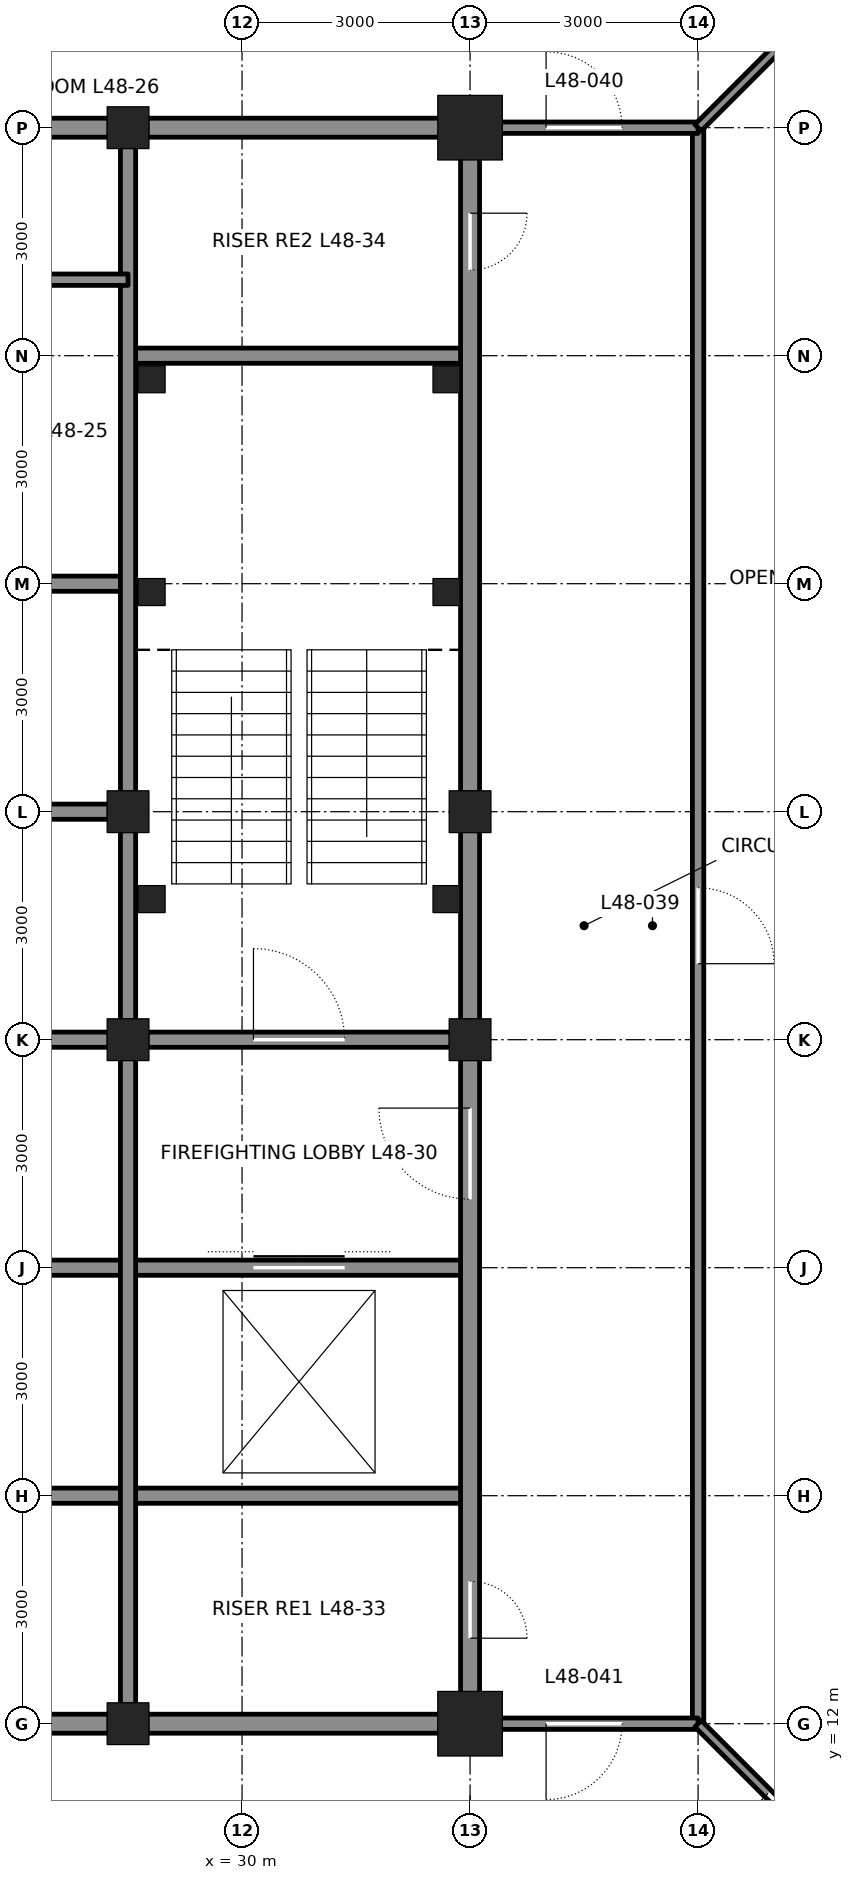
"""IFC4 building model, lengths in metres.
Left out: names, types, materials, properties, quantities, classifications, styles, units other than length and angle.
Written with IfcOpenShell. Run it as: python <this file> out.ifc"""

import sys

from ifc_helpers import new_model, si_unit, direction, frame, frame_2d, origin, origin_2d, place, context, subcontext, project, spatial, rectangle, hollow_rectangle, extrude, element, fill, save


model = new_model("IFC4")
c1 = context("Model", 3, precision=1e-05, world=origin(), true_north=direction((0.0, 1.0)))
c2 = subcontext(c1, "Body", "Model", "MODEL_VIEW")
j1 = project(units=[si_unit("LENGTHUNIT", "METRE"), si_unit("PLANEANGLEUNIT", "RADIAN")], contexts=[c1])
p1 = place(None, origin())
s1 = spatial("IfcSite", under=j1, at=p1, CompositionType="ELEMENT")
p2 = place(p1, origin())
s2 = spatial("IfcBuilding", under=s1, at=p2, CompositionType="ELEMENT")
p3 = place(p2, frame((0.0, 0.0, 218.1)))
s3 = spatial("IfcBuildingStorey", under=s2, at=p3, CompositionType="ELEMENT", Elevation=218.1)
p4 = place(p3, frame((28.5, 12.0, 0.0), z_axis=(0.0, 0.0, 1.0), x_axis=(1.0, 0.0, 0.0)))
e1 = element("IfcColumn", 1, at=p4, inside=s3, PredefinedType="COLUMN", context=c2, shape_type="SweptSolid", body=[
    extrude(hollow_rectangle(XDim=0.55, YDim=0.55, WallThickness=0.045, at=origin_2d()), origin(), (0.0, 0.0, 1.0), 4.2),
])
p5 = place(p3, frame((33.0, 12.0, 0.0), z_axis=(0.0, 0.0, 1.0), x_axis=(1.0, 0.0, 0.0)))
e2 = element("IfcColumn", 2, at=p5, inside=s3, PredefinedType="COLUMN", context=c2, shape_type="SweptSolid", body=[
    extrude(hollow_rectangle(XDim=0.85, YDim=0.85, WallThickness=0.085, at=origin_2d()), origin(), (0.0, 0.0, 1.0), 4.2),
])
p6 = place(p3, frame((28.5, 33.0, 0.0), z_axis=(0.0, 0.0, 1.0), x_axis=(1.0, 0.0, 0.0)))
e3 = element("IfcColumn", 3, at=p6, inside=s3, PredefinedType="COLUMN", context=c2, shape_type="SweptSolid", body=[
    extrude(hollow_rectangle(XDim=0.55, YDim=0.55, WallThickness=0.045, at=origin_2d()), origin(), (0.0, 0.0, 1.0), 4.2),
])
p7 = place(p3, frame((33.0, 33.0, 0.0), z_axis=(0.0, 0.0, 1.0), x_axis=(1.0, 0.0, 0.0)))
e4 = element("IfcColumn", 4, at=p7, inside=s3, PredefinedType="COLUMN", context=c2, shape_type="SweptSolid", body=[
    extrude(hollow_rectangle(XDim=0.85, YDim=0.85, WallThickness=0.085, at=origin_2d()), origin(), (0.0, 0.0, 1.0), 4.2),
])
for number, where, z_axis, x_axis in (
    (5, (33.0, 21.0, 0.0), (0.0, 0.0, 1.0), (1.0, 0.0, 0.0)),
    (6, (33.0, 24.0, 0.0), (0.0, 0.0, 1.0), (1.0, 0.0, 0.0)),
    (7, (28.5, 21.0, 0.0), (0.0, 0.0, 1.0), (1.0, 0.0, 0.0)),
    (8, (28.5, 24.0, 0.0), (0.0, 0.0, 1.0), (1.0, 0.0, 0.0)),
):
    element("IfcColumn", number, at=place(p3, frame(where, z_axis=z_axis, x_axis=x_axis)), inside=s3, PredefinedType="COLUMN", context=c2, shape_type="SweptSolid", body=[
        extrude(hollow_rectangle(XDim=0.55, YDim=0.55, WallThickness=0.045, at=origin_2d()), origin(), (0.0, 0.0, 1.0), 4.2),
    ])
p8 = place(p3, frame((25.75, 12.0, 0.0), z_axis=(0.0, 0.0, 1.0), x_axis=(1.0, 0.0, 0.0)))
e9 = element("IfcWall", 9, at=p8, inside=s3, PredefinedType="SOLIDWALL", context=c2, shape_type="SweptSolid", body=[
    extrude(rectangle(XDim=2.5, YDim=0.25, at=frame_2d((1.25, 0.0))), origin(), (0.0, 0.0, 1.0), 3.181),
])
p9 = place(p3, frame((28.75, 12.0, 0.0), z_axis=(0.0, 0.0, 1.0), x_axis=(1.0, 0.0, 0.0)))
e10 = element("IfcWall", 10, at=p9, inside=s3, PredefinedType="SOLIDWALL", context=c2, shape_type="SweptSolid", body=[
    extrude(rectangle(XDim=4.0, YDim=0.25, at=frame_2d((2.0, 0.0))), origin(), (0.0, 0.0, 1.0), 3.181),
])
p10 = place(p3, frame((25.5, 15.0, 0.0), z_axis=(0.0, 0.0, 1.0), x_axis=(1.0, 0.0, 0.0)))
e11 = element("IfcWall", 11, at=p10, inside=s3, PredefinedType="SOLIDWALL", context=c2, shape_type="SweptSolid", body=[
    extrude(rectangle(XDim=7.5, YDim=0.2, at=frame_2d((3.75, 0.0))), origin(), (0.0, 0.0, 1.0), 4.04),
])
p11 = place(p3, frame((25.5, 24.0, 0.0), z_axis=(0.0, 0.0, 1.0), x_axis=(1.0, 0.0, 0.0)))
e12 = element("IfcWall", 12, at=p11, inside=s3, PredefinedType="SOLIDWALL", context=c2, shape_type="SweptSolid", body=[
    extrude(rectangle(XDim=2.75, YDim=0.2, at=frame_2d((1.375, 0.0))), origin(), (0.0, 0.0, 1.0), 3.09),
])
p12 = place(p3, frame((25.5, 27.0, 0.0), z_axis=(0.0, 0.0, 1.0), x_axis=(1.0, 0.0, 0.0)))
e13 = element("IfcWall", 13, at=p12, inside=s3, PredefinedType="SOLIDWALL", context=c2, shape_type="SweptSolid", body=[
    extrude(rectangle(XDim=3.0, YDim=0.2, at=frame_2d((1.5, 0.0))), origin(), (0.0, 0.0, 1.0), 4.04),
])
p13 = place(p3, frame((28.5, 30.0, 0.0), z_axis=(0.0, 0.0, 1.0), x_axis=(1.0, 0.0, 0.0)))
e14 = element("IfcWall", 14, at=p13, inside=s3, PredefinedType="SOLIDWALL", context=c2, shape_type="SweptSolid", body=[
    extrude(rectangle(XDim=4.5, YDim=0.2, at=frame_2d((2.25, 0.0))), origin(), (0.0, 0.0, 1.0), 4.04),
])
p14 = place(p3, frame((25.75, 33.0, 0.0), z_axis=(0.0, 0.0, 1.0), x_axis=(1.0, 0.0, 0.0)))
e15 = element("IfcWall", 15, at=p14, inside=s3, PredefinedType="SOLIDWALL", context=c2, shape_type="SweptSolid", body=[
    extrude(rectangle(XDim=2.5, YDim=0.25, at=frame_2d((1.25, 0.0))), origin(), (0.0, 0.0, 1.0), 3.181),
])
p15 = place(p3, frame((28.75, 33.0, 0.0), z_axis=(0.0, 0.0, 1.0), x_axis=(1.0, 0.0, 0.0)))
e16 = element("IfcWall", 16, at=p15, inside=s3, PredefinedType="SOLIDWALL", context=c2, shape_type="SweptSolid", body=[
    extrude(rectangle(XDim=4.0, YDim=0.25, at=frame_2d((2.0, 0.0))), origin(), (0.0, 0.0, 1.0), 3.181),
])
p16 = place(p3, frame((25.5, 18.0, 0.0), z_axis=(0.0, 0.0, 1.0), x_axis=(1.0, 0.0, 0.0)))
e17 = element("IfcWall", 17, at=p16, inside=s3, PredefinedType="SOLIDWALL", context=c2, shape_type="SweptSolid", body=[
    extrude(rectangle(XDim=7.5, YDim=0.2, at=frame_2d((3.75, 0.0))), origin(), (0.0, 0.0, 1.0), 4.04),
])
p17 = place(p16, frame((4.65, 0.0, 0.0)))
e18 = element("IfcOpeningElement", 18, at=p17, cuts=e17, PredefinedType="OPENING", context=c2, shape_type="SweptSolid", body=[
    extrude(rectangle(XDim=1.2, YDim=2.1, at=frame_2d((0.6, 1.05))), frame((0.0, 0.11, 0.0), z_axis=(0.0, -1.0, 0.0), x_axis=(1.0, 0.0, 0.0)), (0.0, 0.0, 1.0), 0.22),
])
p18 = place(p3, frame((25.5, 21.0, 0.0), z_axis=(0.0, 0.0, 1.0), x_axis=(1.0, 0.0, 0.0)))
e19 = element("IfcWall", 19, at=p18, inside=s3, PredefinedType="SOLIDWALL", context=c2, shape_type="SweptSolid", body=[
    extrude(rectangle(XDim=2.75, YDim=0.2, at=frame_2d((1.375, 0.0))), origin(), (0.0, 0.0, 1.0), 3.09),
])
p19 = place(p3, frame((28.75, 21.0, 0.0), z_axis=(0.0, 0.0, 1.0), x_axis=(1.0, 0.0, 0.0)))
e20 = element("IfcWall", 20, at=p19, inside=s3, PredefinedType="SOLIDWALL", context=c2, shape_type="SweptSolid", body=[
    extrude(rectangle(XDim=4.0, YDim=0.2, at=frame_2d((2.0, 0.0))), origin(), (0.0, 0.0, 1.0), 3.09),
])
p20 = place(p19, frame((1.4, 0.0, 0.0)))
e21 = element("IfcOpeningElement", 21, at=p20, cuts=e20, PredefinedType="OPENING", context=c2, shape_type="SweptSolid", body=[
    extrude(rectangle(XDim=1.2, YDim=2.1, at=frame_2d((0.6, 1.05))), frame((0.0, 0.11, 0.0), z_axis=(0.0, -1.0, 0.0), x_axis=(1.0, 0.0, 0.0)), (0.0, 0.0, 1.0), 0.22),
])
p21 = place(p3, frame((28.5, 12.25, 0.0), z_axis=(0.0, 0.0, 1.0), x_axis=(0.0, 1.0, 0.0)))
e22 = element("IfcWall", 22, at=p21, inside=s3, PredefinedType="SOLIDWALL", context=c2, shape_type="SweptSolid", body=[
    extrude(rectangle(XDim=8.5, YDim=0.2, at=frame_2d((4.25, 0.0))), origin(), (0.0, 0.0, 1.0), 3.113),
])
p22 = place(p3, frame((28.5, 21.25, 0.0), z_axis=(0.0, 0.0, 1.0), x_axis=(0.0, 1.0, 0.0)))
e23 = element("IfcWall", 23, at=p22, inside=s3, PredefinedType="SOLIDWALL", context=c2, shape_type="SweptSolid", body=[
    extrude(rectangle(XDim=2.5, YDim=0.2, at=frame_2d((1.25, 0.0))), origin(), (0.0, 0.0, 1.0), 3.113),
])
p23 = place(p3, frame((28.5, 24.25, 0.0), z_axis=(0.0, 0.0, 1.0), x_axis=(0.0, 1.0, 0.0)))
e24 = element("IfcWall", 24, at=p23, inside=s3, PredefinedType="SOLIDWALL", context=c2, shape_type="SweptSolid", body=[
    extrude(rectangle(XDim=8.5, YDim=0.2, at=frame_2d((4.25, 0.0))), origin(), (0.0, 0.0, 1.0), 3.113),
])
p24 = place(p3, frame((33.0, 12.25, 0.0), z_axis=(0.0, 0.0, 1.0), x_axis=(0.0, 1.0, 0.0)))
e25 = element("IfcWall", 25, at=p24, inside=s3, PredefinedType="SOLIDWALL", context=c2, shape_type="SweptSolid", body=[
    extrude(rectangle(XDim=8.5, YDim=0.25, at=frame_2d((4.25, 0.0))), origin(), (0.0, 0.0, 1.0), 3.113),
])
p25 = place(p24, frame((6.65, 0.0, 0.0)))
e26 = element("IfcOpeningElement", 26, at=p25, cuts=e25, PredefinedType="OPENING", context=c2, shape_type="SweptSolid", body=[
    extrude(rectangle(XDim=1.2, YDim=2.1, at=frame_2d((0.6, 1.05))), frame((0.0, 0.135, 0.0), z_axis=(0.0, -1.0, 0.0), x_axis=(1.0, 0.0, 0.0)), (0.0, 0.0, 1.0), 0.27),
])
p26 = place(p24, frame((0.875, 0.0, 0.0)))
e27 = element("IfcOpeningElement", 27, at=p26, cuts=e25, PredefinedType="OPENING", context=c2, shape_type="SweptSolid", body=[
    extrude(rectangle(XDim=0.75, YDim=2.1, at=frame_2d((0.375, 1.05))), frame((0.0, 0.135, 0.0), z_axis=(0.0, -1.0, 0.0), x_axis=(1.0, 0.0, 0.0)), (0.0, 0.0, 1.0), 0.27),
])
p27 = place(p3, frame((33.0, 21.25, 0.0), z_axis=(0.0, 0.0, 1.0), x_axis=(0.0, 1.0, 0.0)))
e28 = element("IfcWall", 28, at=p27, inside=s3, PredefinedType="SOLIDWALL", context=c2, shape_type="SweptSolid", body=[
    extrude(rectangle(XDim=2.5, YDim=0.25, at=frame_2d((1.25, 0.0))), origin(), (0.0, 0.0, 1.0), 3.113),
])
p28 = place(p3, frame((33.0, 24.25, 0.0), z_axis=(0.0, 0.0, 1.0), x_axis=(0.0, 1.0, 0.0)))
e29 = element("IfcWall", 29, at=p28, inside=s3, PredefinedType="SOLIDWALL", context=c2, shape_type="SweptSolid", body=[
    extrude(rectangle(XDim=8.5, YDim=0.25, at=frame_2d((4.25, 0.0))), origin(), (0.0, 0.0, 1.0), 3.113),
])
p29 = place(p28, frame((6.875, 0.0, 0.0)))
e30 = element("IfcOpeningElement", 30, at=p29, cuts=e29, PredefinedType="OPENING", context=c2, shape_type="SweptSolid", body=[
    extrude(rectangle(XDim=0.75, YDim=2.1, at=frame_2d((0.375, 1.05))), frame((0.0, 0.135, 0.0), z_axis=(0.0, -1.0, 0.0), x_axis=(1.0, 0.0, 0.0)), (0.0, 0.0, 1.0), 0.27),
])
p30 = place(p3, frame((25.5, 31.0, 0.0), z_axis=(0.0, 0.0, 1.0), x_axis=(1.0, 0.0, 0.0)))
e31 = element("IfcWall", 31, at=p30, inside=s3, PredefinedType="PARTITIONING", context=c2, shape_type="SweptSolid", body=[
    extrude(rectangle(XDim=3.0, YDim=0.15, at=frame_2d((1.5, 0.0))), origin(), (0.0, 0.0, 1.0), 4.04),
])
p31 = place(p3, frame((36.0, 12.0, 0.0), z_axis=(0.0, 0.0, 1.0), x_axis=(0.0, 1.0, 0.0)))
e32 = element("IfcWall", 32, at=p31, inside=s3, PredefinedType="PARTITIONING", context=c2, shape_type="SweptSolid", body=[
    extrude(rectangle(XDim=21.0, YDim=0.15, at=frame_2d((10.5, 0.0))), origin(), (0.0, 0.0, 1.0), 4.04),
])
p32 = place(p31, frame((10.0, 0.0, 0.0)))
e33 = element("IfcOpeningElement", 33, at=p32, cuts=e32, PredefinedType="OPENING", context=c2, shape_type="SweptSolid", body=[
    extrude(rectangle(XDim=1.0, YDim=2.4, at=frame_2d((0.5, 1.2))), frame((0.0, 0.085, 0.0), z_axis=(0.0, -1.0, 0.0), x_axis=(1.0, 0.0, 0.0)), (0.0, 0.0, 1.0), 0.17),
])
p33 = place(p3, frame((33.0, 33.0, 0.0), z_axis=(0.0, 0.0, 1.0), x_axis=(1.0, 0.0, 0.0)))
e34 = element("IfcWall", 34, at=p33, inside=s3, PredefinedType="PARTITIONING", context=c2, shape_type="SweptSolid", body=[
    extrude(rectangle(XDim=3.0, YDim=0.15, at=frame_2d((1.5, 0.0))), origin(), (0.0, 0.0, 1.0), 3.27),
])
p34 = place(p33, frame((1.0, 0.0, 0.0)))
e35 = element("IfcOpeningElement", 35, at=p34, cuts=e34, PredefinedType="OPENING", context=c2, shape_type="SweptSolid", body=[
    extrude(rectangle(XDim=1.0, YDim=2.4, at=frame_2d((0.5, 1.2))), frame((0.0, 0.085, 0.0), z_axis=(0.0, -1.0, 0.0), x_axis=(1.0, 0.0, 0.0)), (0.0, 0.0, 1.0), 0.17),
])
p35 = place(p3, frame((33.0, 12.0, 0.0), z_axis=(0.0, 0.0, 1.0), x_axis=(1.0, 0.0, 0.0)))
e36 = element("IfcWall", 36, at=p35, inside=s3, PredefinedType="PARTITIONING", context=c2, shape_type="SweptSolid", body=[
    extrude(rectangle(XDim=3.0, YDim=0.15, at=frame_2d((1.5, 0.0))), origin(), (0.0, 0.0, 1.0), 3.27),
])
p36 = place(p35, frame((1.0, 0.0, 0.0)))
e37 = element("IfcOpeningElement", 37, at=p36, cuts=e36, PredefinedType="OPENING", context=c2, shape_type="SweptSolid", body=[
    extrude(rectangle(XDim=1.0, YDim=2.4, at=frame_2d((0.5, 1.2))), frame((0.0, 0.085, 0.0), z_axis=(0.0, -1.0, 0.0), x_axis=(1.0, 0.0, 0.0)), (0.0, 0.0, 1.0), 0.17),
])
p37 = place(p3, frame((36.0, 33.0, 0.0), z_axis=(0.0, 0.0, 1.0), x_axis=(0.707106781187, 0.707106781187, 0.0)))
e38 = element("IfcWall", 38, at=p37, inside=s3, PredefinedType="PARTITIONING", context=c2, shape_type="SweptSolid", body=[
    extrude(rectangle(XDim=1.489, YDim=0.12, at=frame_2d((0.745, 0.0))), origin(), (0.0, 0.0, 1.0), 4.04),
])
p38 = place(p3, frame((36.0, 12.0, 0.0), z_axis=(0.0, 0.0, 1.0), x_axis=(0.707106781187, -0.707106781187, 0.0)))
e39 = element("IfcWall", 39, at=p38, inside=s3, PredefinedType="PARTITIONING", context=c2, shape_type="SweptSolid", body=[
    extrude(rectangle(XDim=5.732, YDim=0.12, at=frame_2d((2.866, 0.0))), origin(), (0.0, 0.0, 1.0), 4.04),
])
p39 = place(p38, frame((1.3, 0.0, 0.0)))
e40 = element("IfcOpeningElement", 40, at=p39, cuts=e39, PredefinedType="OPENING", context=c2, shape_type="SweptSolid", body=[
    extrude(rectangle(XDim=1.0, YDim=2.4, at=frame_2d((0.5, 1.2))), frame((0.0, 0.07, 0.0), z_axis=(0.0, -1.0, 0.0), x_axis=(1.0, 0.0, 0.0)), (0.0, 0.0, 1.0), 0.14),
])
for number, where, z_axis, x_axis in (
    (41, (28.81, 29.69, 0.0), (0.0, 0.0, 1.0), (1.0, 0.0, 0.0)),
    (42, (32.69, 29.69, 0.0), (0.0, 0.0, 1.0), (1.0, 0.0, 0.0)),
    (43, (28.81, 26.89, 0.0), (0.0, 0.0, 1.0), (1.0, 0.0, 0.0)),
    (44, (32.69, 26.89, 0.0), (0.0, 0.0, 1.0), (1.0, 0.0, 0.0)),
    (45, (28.81, 22.85, 0.0), (0.0, 0.0, 1.0), (1.0, 0.0, 0.0)),
    (46, (32.69, 22.85, 0.0), (0.0, 0.0, 1.0), (1.0, 0.0, 0.0)),
):
    element("IfcColumn", number, at=place(p3, frame(where, z_axis=z_axis, x_axis=x_axis)), inside=s3, PredefinedType="COLUMN", context=c2, shape_type="SweptSolid", body=[
        extrude(hollow_rectangle(XDim=0.356, YDim=0.356, WallThickness=0.009, at=origin_2d()), origin(), (0.0, 0.0, 1.0), 4.2),
    ])
p40 = place(p20, origin())
e47 = element("IfcDoor", 47, at=p40, inside=s3, OperationType="SINGLE_SWING_LEFT", PredefinedType="DOOR", context=c2, shape_type="SweptSolid", body=[
    extrude(rectangle(XDim=1.2, YDim=2.1, at=frame_2d((0.6, 1.05))), frame((0.0, 0.025, 0.0), z_axis=(0.0, -1.0, 0.0), x_axis=(1.0, 0.0, 0.0)), (0.0, 0.0, 1.0), 0.05),
])
fill(e21, e47)
p41 = place(p25, origin())
e48 = element("IfcDoor", 48, at=p41, inside=s3, OperationType="SINGLE_SWING_RIGHT", PredefinedType="DOOR", context=c2, shape_type="SweptSolid", body=[
    extrude(rectangle(XDim=1.2, YDim=2.1, at=frame_2d((0.6, 1.05))), frame((0.0, 0.025, 0.0), z_axis=(0.0, -1.0, 0.0), x_axis=(1.0, 0.0, 0.0)), (0.0, 0.0, 1.0), 0.05),
])
fill(e26, e48)
p42 = place(p17, origin())
e49 = element("IfcDoor", 49, at=p42, inside=s3, OperationType="DOUBLE_DOOR_SLIDING", PredefinedType="DOOR", context=c2, shape_type="SweptSolid", body=[
    extrude(rectangle(XDim=1.2, YDim=2.1, at=frame_2d((0.6, 1.05))), frame((0.0, 0.025, 0.0), z_axis=(0.0, -1.0, 0.0), x_axis=(1.0, 0.0, 0.0)), (0.0, 0.0, 1.0), 0.05),
])
fill(e18, e49)
p43 = place(p26, frame((0.75, 0.0, 0.0), z_axis=(0.0, 0.0, 1.0), x_axis=(-1.0, 0.0, 0.0)))
e50 = element("IfcDoor", 50, at=p43, inside=s3, OperationType="SINGLE_SWING_RIGHT", PredefinedType="DOOR", context=c2, shape_type="SweptSolid", body=[
    extrude(rectangle(XDim=0.75, YDim=2.1, at=frame_2d((0.375, 1.05))), frame((0.0, 0.025, 0.0), z_axis=(0.0, -1.0, 0.0), x_axis=(1.0, 0.0, 0.0)), (0.0, 0.0, 1.0), 0.05),
])
fill(e27, e50)
p44 = place(p29, frame((0.75, 0.0, 0.0), z_axis=(0.0, 0.0, 1.0), x_axis=(-1.0, 0.0, 0.0)))
e51 = element("IfcDoor", 51, at=p44, inside=s3, OperationType="SINGLE_SWING_LEFT", PredefinedType="DOOR", context=c2, shape_type="SweptSolid", body=[
    extrude(rectangle(XDim=0.75, YDim=2.1, at=frame_2d((0.375, 1.05))), frame((0.0, 0.025, 0.0), z_axis=(0.0, -1.0, 0.0), x_axis=(1.0, 0.0, 0.0)), (0.0, 0.0, 1.0), 0.05),
])
fill(e30, e51)
p45 = place(p32, frame((1.0, 0.0, 0.0), z_axis=(0.0, 0.0, 1.0), x_axis=(-1.0, 0.0, 0.0)))
e52 = element("IfcDoor", 52, at=p45, inside=s3, OperationType="SINGLE_SWING_RIGHT", PredefinedType="DOOR", context=c2, shape_type="SweptSolid", body=[
    extrude(rectangle(XDim=1.0, YDim=2.4, at=frame_2d((0.5, 1.2))), frame((0.0, 0.025, 0.0), z_axis=(0.0, -1.0, 0.0), x_axis=(1.0, 0.0, 0.0)), (0.0, 0.0, 1.0), 0.05),
])
fill(e33, e52)
p46 = place(p34, origin())
e53 = element("IfcDoor", 53, at=p46, inside=s3, OperationType="SINGLE_SWING_LEFT", PredefinedType="DOOR", context=c2, shape_type="SweptSolid", body=[
    extrude(rectangle(XDim=1.0, YDim=2.4, at=frame_2d((0.5, 1.2))), frame((0.0, 0.025, 0.0), z_axis=(0.0, -1.0, 0.0), x_axis=(1.0, 0.0, 0.0)), (0.0, 0.0, 1.0), 0.05),
])
fill(e35, e53)
p47 = place(p36, frame((1.0, 0.0, 0.0), z_axis=(0.0, 0.0, 1.0), x_axis=(-1.0, 0.0, 0.0)))
e54 = element("IfcDoor", 54, at=p47, inside=s3, OperationType="SINGLE_SWING_RIGHT", PredefinedType="DOOR", context=c2, shape_type="SweptSolid", body=[
    extrude(rectangle(XDim=1.0, YDim=2.4, at=frame_2d((0.5, 1.2))), frame((0.0, 0.025, 0.0), z_axis=(0.0, -1.0, 0.0), x_axis=(1.0, 0.0, 0.0)), (0.0, 0.0, 1.0), 0.05),
])
fill(e37, e54)
p48 = place(p39, frame((1.0, 0.0, 0.0), z_axis=(0.0, 0.0, 1.0), x_axis=(-1.0, 0.0, 0.0)))
e55 = element("IfcDoor", 55, at=p48, inside=s3, OperationType="SINGLE_SWING_RIGHT", PredefinedType="DOOR", context=c2, shape_type="SweptSolid", body=[
    extrude(rectangle(XDim=1.0, YDim=2.4, at=frame_2d((0.5, 1.2))), frame((0.0, 0.025, 0.0), z_axis=(0.0, -1.0, 0.0), x_axis=(1.0, 0.0, 0.0)), (0.0, 0.0, 1.0), 0.05),
])
fill(e40, e55)
save(model, sys.argv[1])
